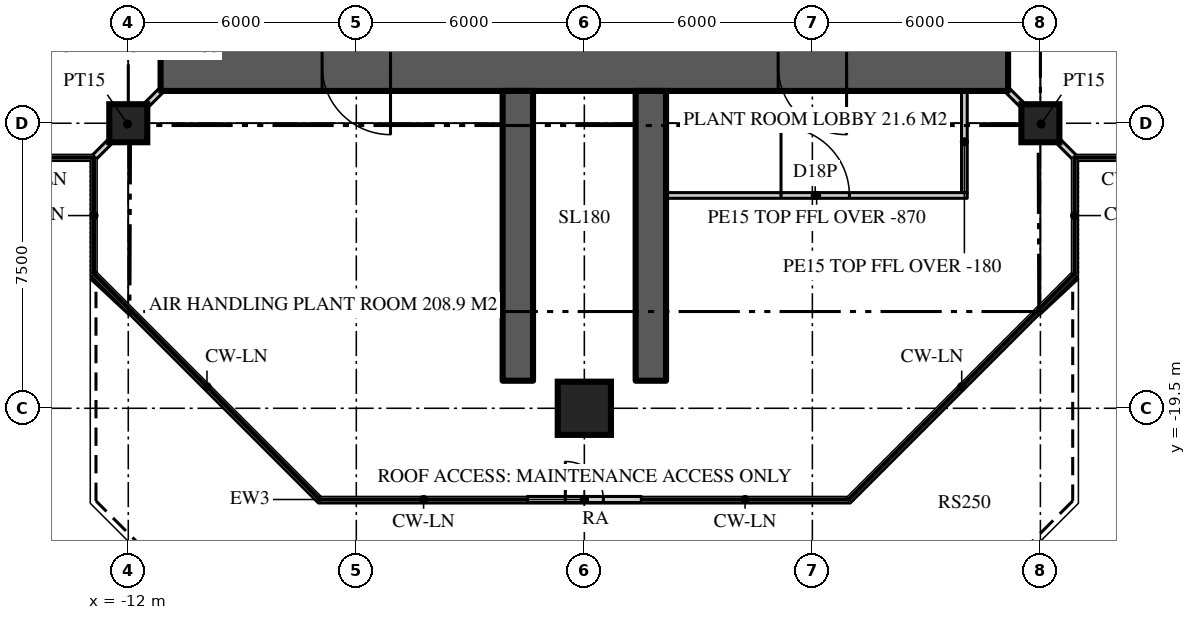
"""IFC4 building model, lengths in metres.
Left out: names, types, materials, properties, quantities, classifications, styles, units other than length and angle.
Written with IfcOpenShell. Run it as: python <this file> out.ifc"""

import sys

from ifc_helpers import new_model, si_unit, direction, frame, frame_2d, origin, origin_2d, place, context, subcontext, project, spatial, rectangle, extrude, element, fill, save


model = new_model("IFC4")
c1 = context("Model", 3, precision=1e-05, world=origin(), true_north=direction((0.0, 1.0)))
c2 = subcontext(c1, "Body", "Model", "MODEL_VIEW")
j1 = project(units=[si_unit("LENGTHUNIT", "METRE"), si_unit("PLANEANGLEUNIT", "RADIAN")], contexts=[c1])
p1 = place(None, origin())
s1 = spatial("IfcSite", under=j1, at=p1, CompositionType="ELEMENT")
p2 = place(p1, origin())
s2 = spatial("IfcBuilding", under=s1, at=p2, CompositionType="ELEMENT")
p3 = place(p2, frame((0.0, 0.0, 306.3)))
s3 = spatial("IfcBuildingStorey", under=s2, at=p3, CompositionType="ELEMENT", Elevation=306.3)
p4 = place(p3, frame((11.15, -10.5, 0.0), z_axis=(0.0, 0.0, 1.0), x_axis=(-1.0, 0.0, 0.0)))
e1 = element("IfcWall", 1, at=p4, inside=s3, PredefinedType="SHEAR", context=c2, shape_type="SweptSolid", body=[
    extrude(rectangle(XDim=22.3, YDim=1.3, at=frame_2d((11.15, 0.0))), origin(), (0.0, 0.0, 1.0), 5.0),
])
p5 = place(p4, frame((16.25, 0.0, 0.0)))
e2 = element("IfcOpeningElement", 2, at=p5, cuts=e1, PredefinedType="OPENING", context=c2, shape_type="SweptSolid", body=[
    extrude(rectangle(XDim=1.8, YDim=2.2, at=frame_2d((0.9, 1.1))), frame((0.0, 0.66, 0.0), z_axis=(0.0, -1.0, 0.0), x_axis=(1.0, 0.0, 0.0)), (0.0, 0.0, 1.0), 1.32),
])
p6 = place(p4, frame((4.25, 0.0, 0.0)))
e3 = element("IfcOpeningElement", 3, at=p6, cuts=e1, PredefinedType="OPENING", context=c2, shape_type="SweptSolid", body=[
    extrude(rectangle(XDim=1.8, YDim=2.2, at=frame_2d((0.9, 1.1))), frame((0.0, 0.66, 0.0), z_axis=(0.0, -1.0, 0.0), x_axis=(1.0, 0.0, 0.0)), (0.0, 0.0, 1.0), 1.32),
])
for number, where, z_axis, x_axis in (
    (4, (-1.75, -11.15, 0.0), (0.0, 0.0, 1.0), (0.0, -1.0, 0.0)),
    (5, (1.75, -11.15, 0.0), (0.0, 0.0, 1.0), (0.0, -1.0, 0.0)),
):
    element("IfcWall", number, at=place(p3, frame(where, z_axis=z_axis, x_axis=x_axis)), inside=s3, PredefinedType="SHEAR", context=c2, shape_type="SweptSolid", body=[
        extrude(rectangle(XDim=7.625, YDim=0.8, at=frame_2d((3.812, 0.0))), origin(), (0.0, 0.0, 1.0), 5.0),
    ])
p7 = place(p3, frame((0.0, -19.5, 0.0), z_axis=(0.0, 0.0, 1.0), x_axis=(1.0, 0.0, 0.0)))
e6 = element("IfcColumn", 6, at=p7, inside=s3, PredefinedType="COLUMN", context=c2, shape_type="SweptSolid", body=[
    extrude(rectangle(XDim=1.4, YDim=1.4, at=origin_2d()), origin(), (0.0, 0.0, 1.0), 5.0),
])
for number, where, z_axis, x_axis in (
    (7, (-12.0, -12.0, 0.0), (0.0, 0.0, 1.0), (1.0, 0.0, 0.0)),
    (8, (12.0, -12.0, 0.0), (0.0, 0.0, 1.0), (1.0, 0.0, 0.0)),
):
    element("IfcColumn", number, at=place(p3, frame(where, z_axis=z_axis, x_axis=x_axis)), inside=s3, PredefinedType="COLUMN", context=c2, shape_type="SweptSolid", body=[
        extrude(rectangle(XDim=1.0, YDim=1.0, at=origin_2d()), origin(), (0.0, 0.0, 1.0), 5.0),
    ])
p8 = place(p3, frame((-1.5, -21.9, 0.0), z_axis=(0.0, 0.0, 1.0), x_axis=(1.0, 0.0, 0.0)))
e9 = element("IfcWall", 9, at=p8, inside=s3, PredefinedType="SOLIDWALL", context=c2, shape_type="SweptSolid", body=[
    extrude(rectangle(XDim=3.0, YDim=0.16, at=frame_2d((1.5, 0.0))), origin(), (0.0, 0.0, 1.0), 4.82),
])
p9 = place(p8, frame((1.0, 0.0, 0.0)))
e10 = element("IfcOpeningElement", 10, at=p9, cuts=e9, PredefinedType="OPENING", context=c2, shape_type="SweptSolid", body=[
    extrude(rectangle(XDim=1.0, YDim=2.2, at=frame_2d((0.5, 1.1))), frame((0.0, 0.09, 0.0), z_axis=(0.0, -1.0, 0.0), x_axis=(1.0, 0.0, 0.0)), (0.0, 0.0, 1.0), 0.18),
])
p10 = place(p3, frame((2.15, -13.9, 0.0), z_axis=(0.0, 0.0, 1.0), x_axis=(1.0, 0.0, 0.0)))
e11 = element("IfcWall", 11, at=p10, inside=s3, PredefinedType="SOLIDWALL", context=c2, shape_type="SweptSolid", body=[
    extrude(rectangle(XDim=7.925, YDim=0.15, at=frame_2d((3.962, 0.0))), origin(), (0.0, 0.0, 1.0), 4.13),
])
p11 = place(p10, frame((3.025, 0.0, 0.0)))
e12 = element("IfcOpeningElement", 12, at=p11, cuts=e11, PredefinedType="OPENING", context=c2, shape_type="SweptSolid", body=[
    extrude(rectangle(XDim=1.8, YDim=2.4, at=frame_2d((0.9, 1.2))), frame((0.0, 0.085, 0.0), z_axis=(0.0, -1.0, 0.0), x_axis=(1.0, 0.0, 0.0)), (0.0, 0.0, 1.0), 0.17),
])
p12 = place(p3, frame((10.0, -11.15, 0.0), z_axis=(0.0, 0.0, 1.0), x_axis=(0.0, -1.0, 0.0)))
e13 = element("IfcWall", 13, at=p12, inside=s3, PredefinedType="SOLIDWALL", context=c2, shape_type="SweptSolid", body=[
    extrude(rectangle(XDim=2.675, YDim=0.15, at=frame_2d((1.337, 0.0))), origin(), (0.0, 0.0, 1.0), 4.82),
])
for number, where, z_axis, x_axis in (
    (14, (-11.15, -11.15, 0.0), (0.0, 0.0, 1.0), (-0.707, -0.707, 0.0)),
    (15, (11.15, -11.15, 0.0), (0.0, 0.0, 1.0), (0.707, -0.707, 0.0)),
):
    element("IfcWall", number, at=place(p3, frame(where, z_axis=z_axis, x_axis=x_axis)), inside=s3, PredefinedType="PARTITIONING", context=c2, shape_type="SweptSolid", body=[
        extrude(rectangle(XDim=2.461, YDim=0.15, at=frame_2d((1.23, 0.0))), origin(), (0.0, 0.0, 1.0), 4.82),
    ])
p13 = place(p9, origin())
e16 = element("IfcDoor", 16, at=p13, inside=s3, OperationType="SINGLE_SWING_LEFT", PredefinedType="DOOR", context=c2, shape_type="SweptSolid", body=[
    extrude(rectangle(XDim=1.0, YDim=2.2, at=frame_2d((0.5, 1.1))), frame((0.0, 0.025, 0.0), z_axis=(0.0, -1.0, 0.0), x_axis=(1.0, 0.0, 0.0)), (0.0, 0.0, 1.0), 0.05),
])
fill(e10, e16)
p14 = place(p5, origin())
e17 = element("IfcDoor", 17, at=p14, inside=s3, OperationType="DOUBLE_DOOR_DOUBLE_SWING", PredefinedType="DOOR", context=c2, shape_type="SweptSolid", body=[
    extrude(rectangle(XDim=1.8, YDim=2.2, at=frame_2d((0.9, 1.1))), frame((0.0, 0.025, 0.0), z_axis=(0.0, -1.0, 0.0), x_axis=(1.0, 0.0, 0.0)), (0.0, 0.0, 1.0), 0.05),
])
fill(e2, e17)
p15 = place(p6, origin())
e18 = element("IfcDoor", 18, at=p15, inside=s3, OperationType="DOUBLE_DOOR_DOUBLE_SWING", PredefinedType="DOOR", context=c2, shape_type="SweptSolid", body=[
    extrude(rectangle(XDim=1.8, YDim=2.2, at=frame_2d((0.9, 1.1))), frame((0.0, 0.025, 0.0), z_axis=(0.0, -1.0, 0.0), x_axis=(1.0, 0.0, 0.0)), (0.0, 0.0, 1.0), 0.05),
])
fill(e3, e18)
p16 = place(p11, origin())
e19 = element("IfcDoor", 19, at=p16, inside=s3, OperationType="DOUBLE_DOOR_DOUBLE_SWING", PredefinedType="DOOR", context=c2, shape_type="SweptSolid", body=[
    extrude(rectangle(XDim=1.8, YDim=2.4, at=frame_2d((0.9, 1.2))), frame((0.0, 0.025, 0.0), z_axis=(0.0, -1.0, 0.0), x_axis=(1.0, 0.0, 0.0)), (0.0, 0.0, 1.0), 0.05),
])
fill(e12, e19)
save(model, sys.argv[1])
